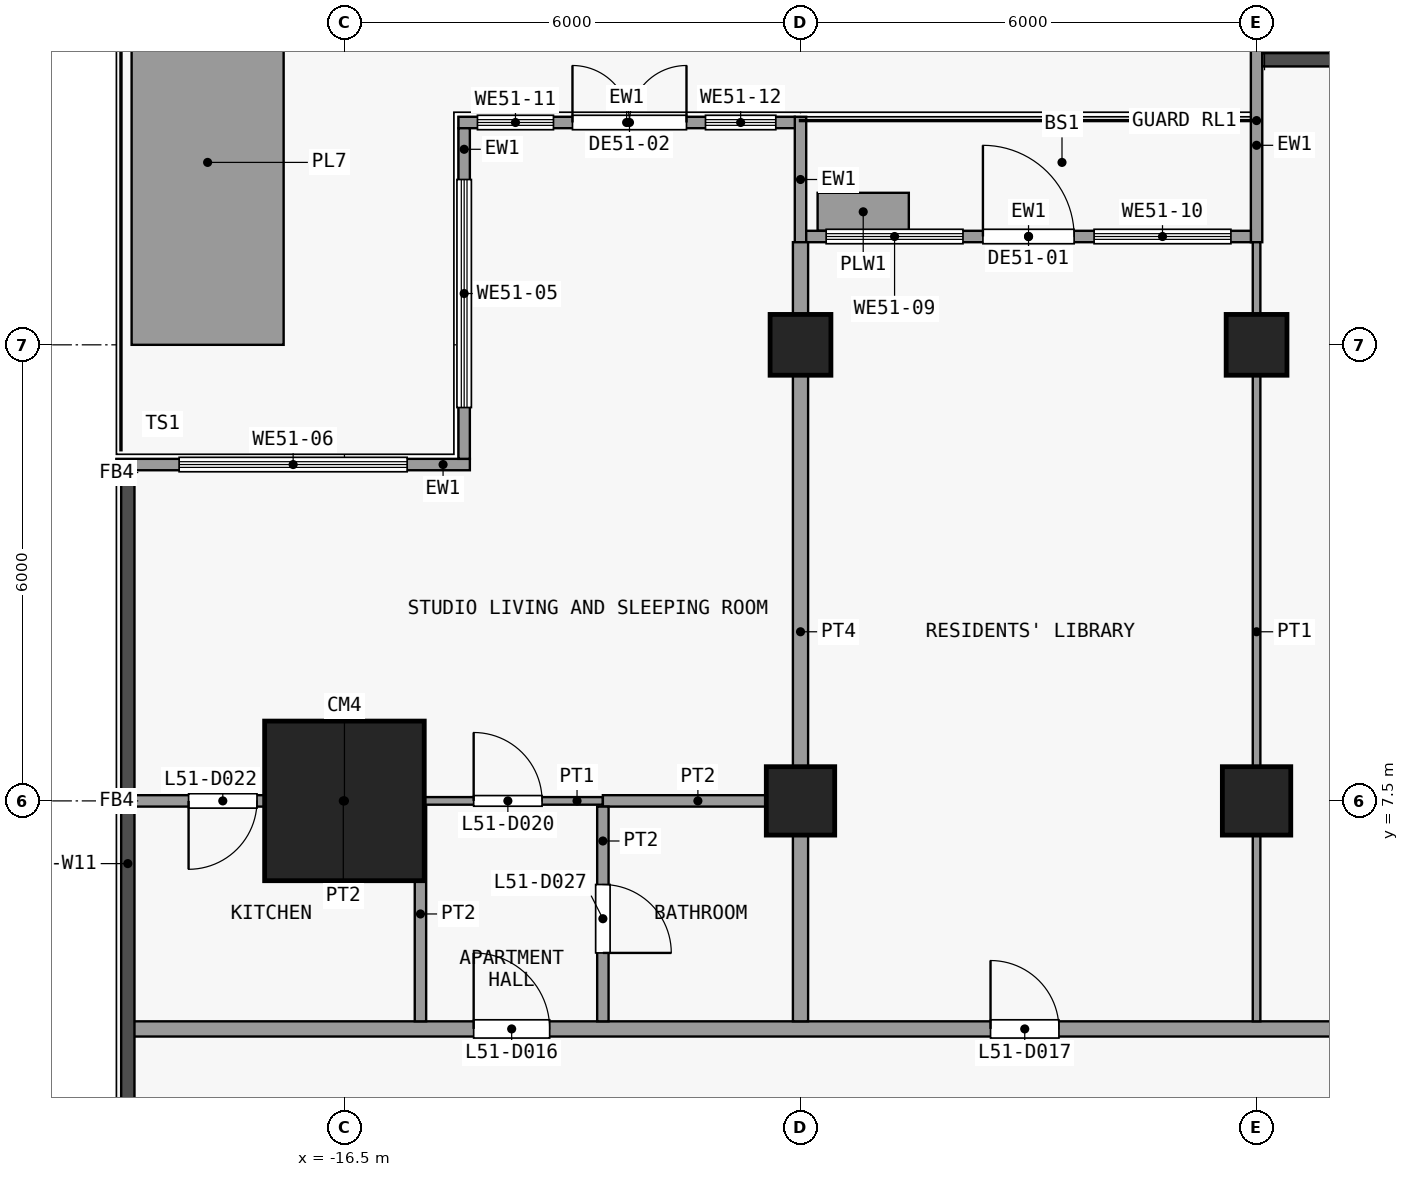
"""IFC4 building model, lengths in metres.
Left out: names, types, materials, properties, quantities, classifications, styles, units other than length and angle.
Written with IfcOpenShell. Run it as: python <this file> out.ifc"""

import sys

from ifc_helpers import new_model, si_unit, direction, frame, frame_2d, origin, origin_2d, place, context, subcontext, project, spatial, rectangle, extrude, element, fill, save


model = new_model("IFC4")
c1 = context("Model", 3, precision=1e-05, world=origin(), true_north=direction((0.0, 1.0)))
c2 = subcontext(c1, "Body", "Model", "MODEL_VIEW")
j1 = project(units=[si_unit("LENGTHUNIT", "METRE"), si_unit("PLANEANGLEUNIT", "RADIAN")], contexts=[c1])
p1 = place(None, origin())
s1 = spatial("IfcSite", under=j1, at=p1, CompositionType="ELEMENT")
p2 = place(p1, origin())
s2 = spatial("IfcBuilding", under=s1, at=p2, CompositionType="ELEMENT")
p3 = place(p2, frame((0.0, 0.0, 205.1)))
s3 = spatial("IfcBuildingStorey", under=s2, at=p3, CompositionType="ELEMENT", Elevation=205.1)
p4 = place(p3, frame((-16.5, 7.5, 0.0), z_axis=(0.0, 0.0, 1.0), x_axis=(1.0, 0.0, 0.0)))
e1 = element("IfcColumn", 1, at=p4, inside=s3, PredefinedType="COLUMN", context=c2, shape_type="SweptSolid", body=[
    extrude(rectangle(XDim=2.1, YDim=2.1, at=origin_2d()), origin(), (0.0, 0.0, 1.0), 3.6),
])
p5 = place(p3, frame((-10.5, 7.5, 0.0), z_axis=(0.0, 0.0, 1.0), x_axis=(1.0, 0.0, 0.0)))
e2 = element("IfcColumn", 2, at=p5, inside=s3, PredefinedType="COLUMN", context=c2, shape_type="SweptSolid", body=[
    extrude(rectangle(XDim=0.9, YDim=0.9, at=origin_2d()), origin(), (0.0, 0.0, 1.0), 3.6),
])
p6 = place(p3, frame((-10.5, 13.5, 0.0), z_axis=(0.0, 0.0, 1.0), x_axis=(1.0, 0.0, 0.0)))
e3 = element("IfcColumn", 3, at=p6, inside=s3, PredefinedType="COLUMN", context=c2, shape_type="SweptSolid", body=[
    extrude(rectangle(XDim=0.8, YDim=0.8, at=origin_2d()), origin(), (0.0, 0.0, 1.0), 3.6),
])
p7 = place(p3, frame((-4.5, 7.5, 0.0), z_axis=(0.0, 0.0, 1.0), x_axis=(1.0, 0.0, 0.0)))
e4 = element("IfcColumn", 4, at=p7, inside=s3, PredefinedType="COLUMN", context=c2, shape_type="SweptSolid", body=[
    extrude(rectangle(XDim=0.9, YDim=0.9, at=origin_2d()), origin(), (0.0, 0.0, 1.0), 3.6),
])
p8 = place(p3, frame((-4.5, 13.5, 0.0), z_axis=(0.0, 0.0, 1.0), x_axis=(1.0, 0.0, 0.0)))
e5 = element("IfcColumn", 5, at=p8, inside=s3, PredefinedType="COLUMN", context=c2, shape_type="SweptSolid", body=[
    extrude(rectangle(XDim=0.8, YDim=0.8, at=origin_2d()), origin(), (0.0, 0.0, 1.0), 3.6),
])
p9 = place(p3, frame((-14.925, 12.0, 0.0), z_axis=(0.0, 0.0, 1.0), x_axis=(0.0, 1.0, 0.0)))
e6 = element("IfcWall", 6, at=p9, inside=s3, PredefinedType="SOLIDWALL", context=c2, shape_type="SweptSolid", body=[
    extrude(rectangle(XDim=4.35, YDim=0.15, at=frame_2d((2.175, 0.0))), origin(), (0.0, 0.0, 1.0), 3.3),
])
p10 = place(p9, frame((0.675, 0.0, 0.9)))
e7 = element("IfcOpeningElement", 7, at=p10, cuts=e6, PredefinedType="OPENING", context=c2, shape_type="SweptSolid", body=[
    extrude(rectangle(XDim=3.0, YDim=2.4, at=frame_2d((1.5, 1.2))), frame((0.0, 0.085, 0.0), z_axis=(0.0, -1.0, 0.0), x_axis=(1.0, 0.0, 0.0)), (0.0, 0.0, 1.0), 0.17),
])
p11 = place(p3, frame((-19.5, 11.925, 0.0), z_axis=(0.0, 0.0, 1.0), x_axis=(1.0, 0.0, 0.0)))
e8 = element("IfcWall", 8, at=p11, inside=s3, PredefinedType="SOLIDWALL", context=c2, shape_type="SweptSolid", body=[
    extrude(rectangle(XDim=4.65, YDim=0.15, at=frame_2d((2.325, 0.0))), origin(), (0.0, 0.0, 1.0), 3.3),
])
p12 = place(p11, frame((0.825, 0.0, 0.9)))
e9 = element("IfcOpeningElement", 9, at=p12, cuts=e8, PredefinedType="OPENING", context=c2, shape_type="SweptSolid", body=[
    extrude(rectangle(XDim=3.0, YDim=2.4, at=frame_2d((1.5, 1.2))), frame((0.0, 0.085, 0.0), z_axis=(0.0, -1.0, 0.0), x_axis=(1.0, 0.0, 0.0)), (0.0, 0.0, 1.0), 0.17),
])
p13 = place(p3, frame((-10.5, 14.85, 0.0), z_axis=(0.0, 0.0, 1.0), x_axis=(0.0, 1.0, 0.0)))
e10 = element("IfcWall", 10, at=p13, inside=s3, PredefinedType="SOLIDWALL", context=c2, shape_type="SweptSolid", body=[
    extrude(rectangle(XDim=1.65, YDim=0.15, at=frame_2d((0.825, 0.0))), origin(), (0.0, 0.0, 1.0), 3.3),
])
p14 = place(p3, frame((-4.5, 14.85, 0.0), z_axis=(0.0, 0.0, 1.0), x_axis=(0.0, 1.0, 0.0)))
e11 = element("IfcWall", 11, at=p14, inside=s3, PredefinedType="SOLIDWALL", context=c2, shape_type="SweptSolid", body=[
    extrude(rectangle(XDim=2.55, YDim=0.15, at=frame_2d((1.275, 0.0))), origin(), (0.0, 0.0, 1.0), 3.3),
])
p15 = place(p3, frame((-10.425, 14.925, 0.0), z_axis=(0.0, 0.0, 1.0), x_axis=(1.0, 0.0, 0.0)))
e12 = element("IfcWall", 12, at=p15, inside=s3, PredefinedType="SOLIDWALL", context=c2, shape_type="SweptSolid", body=[
    extrude(rectangle(XDim=5.85, YDim=0.15, at=frame_2d((2.925, 0.0))), origin(), (0.0, 0.0, 1.0), 3.3),
])
p16 = place(p15, frame((2.325, 0.0, 0.0)))
e13 = element("IfcOpeningElement", 13, at=p16, cuts=e12, PredefinedType="OPENING", context=c2, shape_type="SweptSolid", body=[
    extrude(rectangle(XDim=1.2, YDim=2.4, at=frame_2d((0.6, 1.2))), frame((0.0, 0.085, 0.0), z_axis=(0.0, -1.0, 0.0), x_axis=(1.0, 0.0, 0.0)), (0.0, 0.0, 1.0), 0.17),
])
p17 = place(p15, frame((0.262, 0.0, 0.9)))
e14 = element("IfcOpeningElement", 14, at=p17, cuts=e12, PredefinedType="OPENING", context=c2, shape_type="SweptSolid", body=[
    extrude(rectangle(XDim=1.8, YDim=2.1, at=frame_2d((0.9, 1.05))), frame((0.0, 0.085, 0.0), z_axis=(0.0, -1.0, 0.0), x_axis=(1.0, 0.0, 0.0)), (0.0, 0.0, 1.0), 0.17),
])
p18 = place(p15, frame((3.788, 0.0, 0.9)))
e15 = element("IfcOpeningElement", 15, at=p18, cuts=e12, PredefinedType="OPENING", context=c2, shape_type="SweptSolid", body=[
    extrude(rectangle(XDim=1.8, YDim=2.1, at=frame_2d((0.9, 1.05))), frame((0.0, 0.085, 0.0), z_axis=(0.0, -1.0, 0.0), x_axis=(1.0, 0.0, 0.0)), (0.0, 0.0, 1.0), 0.17),
])
p19 = place(p3, frame((-10.275, 15.25, 0.0), z_axis=(0.0, 0.0, 1.0), x_axis=(1.0, 0.0, 0.0)))
e16 = element("IfcWall", 16, at=p19, inside=s3, PredefinedType="USERDEFINED", context=c2, shape_type="SweptSolid", body=[
    extrude(rectangle(XDim=1.2, YDim=0.5, at=frame_2d((0.6, 0.0))), origin(), (0.0, 0.0, 1.0), 0.9),
])
p20 = place(p3, frame((-15.0, 16.425, 0.0), z_axis=(0.0, 0.0, 1.0), x_axis=(1.0, 0.0, 0.0)))
e17 = element("IfcWall", 17, at=p20, inside=s3, PredefinedType="SOLIDWALL", context=c2, shape_type="SweptSolid", body=[
    extrude(rectangle(XDim=4.425, YDim=0.15, at=frame_2d((2.212, 0.0))), origin(), (0.0, 0.0, 1.0), 3.3),
])
p21 = place(p20, frame((1.5, 0.0, 0.0)))
e18 = element("IfcOpeningElement", 18, at=p21, cuts=e17, PredefinedType="OPENING", context=c2, shape_type="SweptSolid", body=[
    extrude(rectangle(XDim=1.5, YDim=2.4, at=frame_2d((0.75, 1.2))), frame((0.0, 0.085, 0.0), z_axis=(0.0, -1.0, 0.0), x_axis=(1.0, 0.0, 0.0)), (0.0, 0.0, 1.0), 0.17),
])
p22 = place(p20, frame((0.25, 0.0, 0.9)))
e19 = element("IfcOpeningElement", 19, at=p22, cuts=e17, PredefinedType="OPENING", context=c2, shape_type="SweptSolid", body=[
    extrude(rectangle(XDim=1.0, YDim=2.1, at=frame_2d((0.5, 1.05))), frame((0.0, 0.085, 0.0), z_axis=(0.0, -1.0, 0.0), x_axis=(1.0, 0.0, 0.0)), (0.0, 0.0, 1.0), 0.17),
])
p23 = place(p20, frame((3.25, 0.0, 0.9)))
e20 = element("IfcOpeningElement", 20, at=p23, cuts=e17, PredefinedType="OPENING", context=c2, shape_type="SweptSolid", body=[
    extrude(rectangle(XDim=0.925, YDim=2.1, at=frame_2d((0.462, 1.05))), frame((0.0, 0.085, 0.0), z_axis=(0.0, -1.0, 0.0), x_axis=(1.0, 0.0, 0.0)), (0.0, 0.0, 1.0), 0.17),
])
p24 = place(p3, frame((-18.3, 13.5, 0.0), z_axis=(0.0, 0.0, 1.0), x_axis=(0.0, 1.0, 0.0)))
e21 = element("IfcWall", 21, at=p24, inside=s3, PredefinedType="USERDEFINED", context=c2, shape_type="SweptSolid", body=[
    extrude(rectangle(XDim=4.8, YDim=2.0, at=frame_2d((2.4, 0.0))), origin(), (0.0, 0.0, 1.0), 0.9),
])
p25 = place(p3, frame((-19.35, 4.5, 0.0), z_axis=(0.0, 0.0, 1.0), x_axis=(1.0, 0.0, 0.0)))
e22 = element("IfcWall", 22, at=p25, inside=s3, PredefinedType="PARTITIONING", context=c2, shape_type="SweptSolid", body=[
    extrude(rectangle(XDim=38.7, YDim=0.2, at=frame_2d((19.35, 0.0))), origin(), (0.0, 0.0, 1.0), 3.3),
])
p26 = place(p25, frame((4.55, 0.0, 0.0)))
e23 = element("IfcOpeningElement", 23, at=p26, cuts=e22, PredefinedType="OPENING", context=c2, shape_type="SweptSolid", body=[
    extrude(rectangle(XDim=1.0, YDim=2.1, at=frame_2d((0.5, 1.05))), frame((0.0, 0.11, 0.0), z_axis=(0.0, -1.0, 0.0), x_axis=(1.0, 0.0, 0.0)), (0.0, 0.0, 1.0), 0.22),
])
p27 = place(p25, frame((11.35, 0.0, 0.0)))
e24 = element("IfcOpeningElement", 24, at=p27, cuts=e22, PredefinedType="OPENING", context=c2, shape_type="SweptSolid", body=[
    extrude(rectangle(XDim=0.9, YDim=2.1, at=frame_2d((0.45, 1.05))), frame((0.0, 0.11, 0.0), z_axis=(0.0, -1.0, 0.0), x_axis=(1.0, 0.0, 0.0)), (0.0, 0.0, 1.0), 0.22),
])
p28 = place(p25, frame((18.85, 0.0, 0.0)))
e25 = element("IfcOpeningElement", 25, at=p28, cuts=e22, PredefinedType="OPENING", context=c2, shape_type="SweptSolid", body=[
    extrude(rectangle(XDim=0.9, YDim=2.1, at=frame_2d((0.45, 1.05))), frame((0.0, 0.11, 0.0), z_axis=(0.0, -1.0, 0.0), x_axis=(1.0, 0.0, 0.0)), (0.0, 0.0, 1.0), 0.22),
])
p29 = place(p25, frame((30.55, 0.0, 0.0)))
e26 = element("IfcOpeningElement", 26, at=p29, cuts=e22, PredefinedType="OPENING", context=c2, shape_type="SweptSolid", body=[
    extrude(rectangle(XDim=1.0, YDim=2.1, at=frame_2d((0.5, 1.05))), frame((0.0, 0.11, 0.0), z_axis=(0.0, -1.0, 0.0), x_axis=(1.0, 0.0, 0.0)), (0.0, 0.0, 1.0), 0.22),
])
p30 = place(p3, frame((-15.5, 7.5, 0.0), z_axis=(0.0, 0.0, 1.0), x_axis=(1.0, 0.0, 0.0)))
e27 = element("IfcWall", 27, at=p30, inside=s3, PredefinedType="PARTITIONING", context=c2, shape_type="SweptSolid", body=[
    extrude(rectangle(XDim=2.4, YDim=0.1, at=frame_2d((1.2, 0.0))), origin(), (0.0, 0.0, 1.0), 3.3),
])
p31 = place(p30, frame((0.7, 0.0, 0.0)))
e28 = element("IfcOpeningElement", 28, at=p31, cuts=e27, PredefinedType="OPENING", context=c2, shape_type="SweptSolid", body=[
    extrude(rectangle(XDim=0.9, YDim=2.1, at=frame_2d((0.45, 1.05))), frame((0.0, 0.06, 0.0), z_axis=(0.0, -1.0, 0.0), x_axis=(1.0, 0.0, 0.0)), (0.0, 0.0, 1.0), 0.12),
])
p32 = place(p3, frame((-19.262, 7.5, 0.0), z_axis=(0.0, 0.0, 1.0), x_axis=(1.0, 0.0, 0.0)))
e29 = element("IfcWall", 29, at=p32, inside=s3, PredefinedType="PARTITIONING", context=c2, shape_type="SweptSolid", body=[
    extrude(rectangle(XDim=3.762, YDim=0.15, at=frame_2d((1.881, 0.0))), origin(), (0.0, 0.0, 1.0), 3.3),
])
p33 = place(p32, frame((0.712, 0.0, 0.0)))
e30 = element("IfcOpeningElement", 30, at=p33, cuts=e29, PredefinedType="OPENING", context=c2, shape_type="SweptSolid", body=[
    extrude(rectangle(XDim=0.9, YDim=2.1, at=frame_2d((0.45, 1.05))), frame((0.0, 0.085, 0.0), z_axis=(0.0, -1.0, 0.0), x_axis=(1.0, 0.0, 0.0)), (0.0, 0.0, 1.0), 0.17),
])
p34 = place(p3, frame((-13.1, 7.5, 0.0), z_axis=(0.0, 0.0, 1.0), x_axis=(1.0, 0.0, 0.0)))
e31 = element("IfcWall", 31, at=p34, inside=s3, PredefinedType="PARTITIONING", context=c2, shape_type="SweptSolid", body=[
    extrude(rectangle(XDim=2.5, YDim=0.15, at=frame_2d((1.25, 0.0))), origin(), (0.0, 0.0, 1.0), 3.3),
])
p35 = place(p3, frame((-15.5, 4.6, 0.0), z_axis=(0.0, 0.0, 1.0), x_axis=(0.0, 1.0, 0.0)))
e32 = element("IfcWall", 32, at=p35, inside=s3, PredefinedType="PARTITIONING", context=c2, shape_type="SweptSolid", body=[
    extrude(rectangle(XDim=2.825, YDim=0.15, at=frame_2d((1.413, 0.0))), origin(), (0.0, 0.0, 1.0), 3.3),
])
p36 = place(p3, frame((-13.1, 4.6, 0.0), z_axis=(0.0, 0.0, 1.0), x_axis=(0.0, 1.0, 0.0)))
e33 = element("IfcWall", 33, at=p36, inside=s3, PredefinedType="PARTITIONING", context=c2, shape_type="SweptSolid", body=[
    extrude(rectangle(XDim=2.825, YDim=0.15, at=frame_2d((1.413, 0.0))), origin(), (0.0, 0.0, 1.0), 3.3),
])
p37 = place(p36, frame((0.9, 0.0, 0.0)))
e34 = element("IfcOpeningElement", 34, at=p37, cuts=e33, PredefinedType="OPENING", context=c2, shape_type="SweptSolid", body=[
    extrude(rectangle(XDim=0.9, YDim=2.1, at=frame_2d((0.45, 1.05))), frame((0.0, 0.085, 0.0), z_axis=(0.0, -1.0, 0.0), x_axis=(1.0, 0.0, 0.0)), (0.0, 0.0, 1.0), 0.17),
])
p38 = place(p3, frame((-10.5, 4.6, 0.0), z_axis=(0.0, 0.0, 1.0), x_axis=(0.0, 1.0, 0.0)))
e35 = element("IfcWall", 35, at=p38, inside=s3, PredefinedType="PARTITIONING", context=c2, shape_type="SweptSolid", body=[
    extrude(rectangle(XDim=10.25, YDim=0.2, at=frame_2d((5.125, 0.0))), origin(), (0.0, 0.0, 1.0), 3.3),
])
p39 = place(p3, frame((-4.5, 4.6, 0.0), z_axis=(0.0, 0.0, 1.0), x_axis=(0.0, 1.0, 0.0)))
e36 = element("IfcWall", 36, at=p39, inside=s3, PredefinedType="PARTITIONING", context=c2, shape_type="SweptSolid", body=[
    extrude(rectangle(XDim=10.25, YDim=0.1, at=frame_2d((5.125, 0.0))), origin(), (0.0, 0.0, 1.0), 3.3),
])
p40 = place(p10, origin())
e37 = element("IfcWindow", 37, at=p40, inside=s3, PartitioningType="SINGLE_PANEL", PredefinedType="WINDOW", context=c2, shape_type="SweptSolid", body=[
    extrude(rectangle(XDim=3.0, YDim=2.4, at=frame_2d((1.5, 1.2))), frame((0.0, 0.03, 0.0), z_axis=(0.0, -1.0, 0.0), x_axis=(1.0, 0.0, 0.0)), (0.0, 0.0, 1.0), 0.06),
])
fill(e7, e37)
p41 = place(p12, origin())
e38 = element("IfcWindow", 38, at=p41, inside=s3, PartitioningType="SINGLE_PANEL", PredefinedType="WINDOW", context=c2, shape_type="SweptSolid", body=[
    extrude(rectangle(XDim=3.0, YDim=2.4, at=frame_2d((1.5, 1.2))), frame((0.0, 0.03, 0.0), z_axis=(0.0, -1.0, 0.0), x_axis=(1.0, 0.0, 0.0)), (0.0, 0.0, 1.0), 0.06),
])
fill(e9, e38)
p42 = place(p16, origin())
e39 = element("IfcDoor", 39, at=p42, inside=s3, OperationType="SINGLE_SWING_LEFT", PredefinedType="DOOR", context=c2, shape_type="SweptSolid", body=[
    extrude(rectangle(XDim=1.2, YDim=2.4, at=frame_2d((0.6, 1.2))), frame((0.0, 0.025, 0.0), z_axis=(0.0, -1.0, 0.0), x_axis=(1.0, 0.0, 0.0)), (0.0, 0.0, 1.0), 0.05),
])
fill(e13, e39)
p43 = place(p17, origin())
e40 = element("IfcWindow", 40, at=p43, inside=s3, PartitioningType="SINGLE_PANEL", PredefinedType="WINDOW", context=c2, shape_type="SweptSolid", body=[
    extrude(rectangle(XDim=1.8, YDim=2.1, at=frame_2d((0.9, 1.05))), frame((0.0, 0.03, 0.0), z_axis=(0.0, -1.0, 0.0), x_axis=(1.0, 0.0, 0.0)), (0.0, 0.0, 1.0), 0.06),
])
fill(e14, e40)
p44 = place(p18, origin())
e41 = element("IfcWindow", 41, at=p44, inside=s3, PartitioningType="SINGLE_PANEL", PredefinedType="WINDOW", context=c2, shape_type="SweptSolid", body=[
    extrude(rectangle(XDim=1.8, YDim=2.1, at=frame_2d((0.9, 1.05))), frame((0.0, 0.03, 0.0), z_axis=(0.0, -1.0, 0.0), x_axis=(1.0, 0.0, 0.0)), (0.0, 0.0, 1.0), 0.06),
])
fill(e15, e41)
p45 = place(p21, origin())
e42 = element("IfcDoor", 42, at=p45, inside=s3, OperationType="DOUBLE_DOOR_SINGLE_SWING", PredefinedType="DOOR", context=c2, shape_type="SweptSolid", body=[
    extrude(rectangle(XDim=1.5, YDim=2.4, at=frame_2d((0.75, 1.2))), frame((0.0, 0.025, 0.0), z_axis=(0.0, -1.0, 0.0), x_axis=(1.0, 0.0, 0.0)), (0.0, 0.0, 1.0), 0.05),
])
fill(e18, e42)
p46 = place(p22, origin())
e43 = element("IfcWindow", 43, at=p46, inside=s3, PartitioningType="SINGLE_PANEL", PredefinedType="WINDOW", context=c2, shape_type="SweptSolid", body=[
    extrude(rectangle(XDim=1.0, YDim=2.1, at=frame_2d((0.5, 1.05))), frame((0.0, 0.03, 0.0), z_axis=(0.0, -1.0, 0.0), x_axis=(1.0, 0.0, 0.0)), (0.0, 0.0, 1.0), 0.06),
])
fill(e19, e43)
p47 = place(p23, origin())
e44 = element("IfcWindow", 44, at=p47, inside=s3, PartitioningType="SINGLE_PANEL", PredefinedType="WINDOW", context=c2, shape_type="SweptSolid", body=[
    extrude(rectangle(XDim=0.925, YDim=2.1, at=frame_2d((0.462, 1.05))), frame((0.0, 0.03, 0.0), z_axis=(0.0, -1.0, 0.0), x_axis=(1.0, 0.0, 0.0)), (0.0, 0.0, 1.0), 0.06),
])
fill(e20, e44)
p48 = place(p26, origin())
e45 = element("IfcDoor", 45, at=p48, inside=s3, OperationType="SINGLE_SWING_RIGHT", PredefinedType="DOOR", context=c2, shape_type="SweptSolid", body=[
    extrude(rectangle(XDim=1.0, YDim=2.1, at=frame_2d((0.5, 1.05))), frame((0.0, 0.025, 0.0), z_axis=(0.0, -1.0, 0.0), x_axis=(1.0, 0.0, 0.0)), (0.0, 0.0, 1.0), 0.05),
])
fill(e23, e45)
p49 = place(p27, origin())
e46 = element("IfcDoor", 46, at=p49, inside=s3, OperationType="SINGLE_SWING_RIGHT", PredefinedType="DOOR", context=c2, shape_type="SweptSolid", body=[
    extrude(rectangle(XDim=0.9, YDim=2.1, at=frame_2d((0.45, 1.05))), frame((0.0, 0.025, 0.0), z_axis=(0.0, -1.0, 0.0), x_axis=(1.0, 0.0, 0.0)), (0.0, 0.0, 1.0), 0.05),
])
fill(e24, e46)
p50 = place(p31, origin())
e47 = element("IfcDoor", 47, at=p50, inside=s3, OperationType="SINGLE_SWING_RIGHT", PredefinedType="DOOR", context=c2, shape_type="SweptSolid", body=[
    extrude(rectangle(XDim=0.9, YDim=2.1, at=frame_2d((0.45, 1.05))), frame((0.0, 0.025, 0.0), z_axis=(0.0, -1.0, 0.0), x_axis=(1.0, 0.0, 0.0)), (0.0, 0.0, 1.0), 0.05),
])
fill(e28, e47)
p51 = place(p33, origin())
e48 = element("IfcDoor", 48, at=p51, inside=s3, OperationType="SINGLE_SWING_LEFT", PredefinedType="DOOR", context=c2, shape_type="SweptSolid", body=[
    extrude(rectangle(XDim=0.9, YDim=2.1, at=frame_2d((0.45, 1.05))), frame((0.0, 0.025, 0.0), z_axis=(0.0, -1.0, 0.0), x_axis=(1.0, 0.0, 0.0)), (0.0, 0.0, 1.0), 0.05),
])
fill(e30, e48)
p52 = place(p37, origin())
e49 = element("IfcDoor", 49, at=p52, inside=s3, OperationType="SINGLE_SWING_LEFT", PredefinedType="DOOR", context=c2, shape_type="SweptSolid", body=[
    extrude(rectangle(XDim=0.9, YDim=2.1, at=frame_2d((0.45, 1.05))), frame((0.0, 0.025, 0.0), z_axis=(0.0, -1.0, 0.0), x_axis=(1.0, 0.0, 0.0)), (0.0, 0.0, 1.0), 0.05),
])
fill(e34, e49)
save(model, sys.argv[1])
